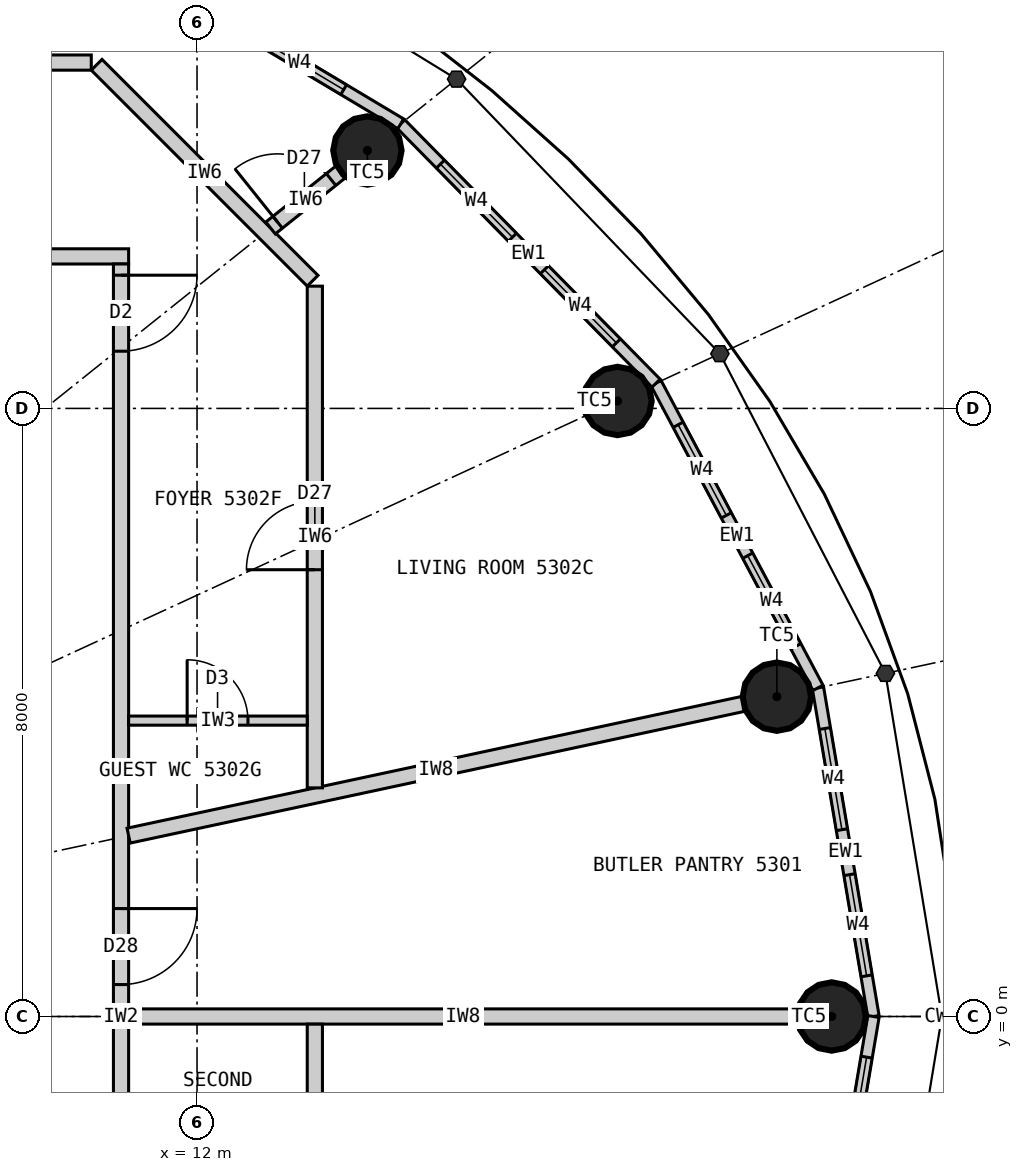
"""IFC4 building model, lengths in metres.
Left out: names, types, materials, properties, quantities, classifications, styles, units other than length and angle.
Written with IfcOpenShell. Run it as: python <this file> out.ifc"""

import sys

from ifc_helpers import new_model, si_unit, direction, frame, frame_2d, origin, origin_2d, place, context, subcontext, project, spatial, rectangle, circle, extrude, element, fill, save


model = new_model("IFC4")
c1 = context("Model", 3, precision=1e-05, world=origin(), true_north=direction((0.0, 1.0)))
c2 = subcontext(c1, "Body", "Model", "MODEL_VIEW")
j1 = project(units=[si_unit("LENGTHUNIT", "METRE"), si_unit("PLANEANGLEUNIT", "RADIAN")], contexts=[c1])
p1 = place(None, origin())
s1 = spatial("IfcSite", under=j1, at=p1, CompositionType="ELEMENT")
p2 = place(p1, origin())
s2 = spatial("IfcBuilding", under=s1, at=p2, CompositionType="ELEMENT")
p3 = place(p2, frame((0.0, 0.0, 199.5)))
s3 = spatial("IfcBuildingStorey", under=s2, at=p3, CompositionType="ELEMENT", Elevation=199.5)
for number, where, z_axis, x_axis in (
    (1, (20.35, 0.0, 0.0), (0.0, 0.0, 1.0), (1.0, 0.0, 0.0)),
    (2, (19.629, 4.208, 0.0), (0.0, 0.0, 1.0), (1.0, 0.0, 0.0)),
    (3, (17.532, 8.098, 0.0), (0.0, 0.0, 1.0), (1.0, 0.0, 0.0)),
    (4, (14.241, 11.393, 0.0), (0.0, 0.0, 1.0), (1.0, 0.0, 0.0)),
):
    element("IfcColumn", number, at=place(p3, frame(where, z_axis=z_axis, x_axis=x_axis)), inside=s3, PredefinedType="COLUMN", context=c2, shape_type="SweptSolid", body=[
        extrude(circle(Radius=0.45, at=origin_2d()), origin(), (0.0, 0.0, 1.0), 3.3),
    ])
p4 = place(p3, frame((20.9, 0.0, 0.0), z_axis=(0.0, 0.0, 1.0), x_axis=(-0.166538513568, 0.986034950445, 0.0)))
e5 = element("IfcWall", 5, at=p4, inside=s3, PredefinedType="ELEMENTEDWALL", context=c2, shape_type="SweptSolid", body=[
    extrude(rectangle(XDim=4.385, YDim=0.15, at=frame_2d((2.192, 0.0))), origin(), (0.0, 0.0, 1.0), 3.12),
])
p5 = place(p4, frame((0.542, 0.0, 0.9)))
e6 = element("IfcOpeningElement", 6, at=p5, cuts=e5, PredefinedType="OPENING", context=c2, shape_type="SweptSolid", body=[
    extrude(rectangle(XDim=1.35, YDim=1.9, at=frame_2d((0.675, 0.95))), frame((0.0, 0.085, 0.0), z_axis=(0.0, -1.0, 0.0), x_axis=(1.0, 0.0, 0.0)), (0.0, 0.0, 1.0), 0.17),
])
p6 = place(p4, frame((2.492, 0.0, 0.9)))
e7 = element("IfcOpeningElement", 7, at=p6, cuts=e5, PredefinedType="OPENING", context=c2, shape_type="SweptSolid", body=[
    extrude(rectangle(XDim=1.35, YDim=1.9, at=frame_2d((0.675, 0.95))), frame((0.0, 0.085, 0.0), z_axis=(0.0, -1.0, 0.0), x_axis=(1.0, 0.0, 0.0)), (0.0, 0.0, 1.0), 0.17),
])
p7 = place(p3, frame((20.17, 4.323, 0.0), z_axis=(0.0, 0.0, 1.0), x_axis=(-0.469256152955, 0.883062094597, 0.0)))
e8 = element("IfcWall", 8, at=p7, inside=s3, PredefinedType="ELEMENTEDWALL", context=c2, shape_type="SweptSolid", body=[
    extrude(rectangle(XDim=4.539, YDim=0.15, at=frame_2d((2.27, 0.0))), origin(), (0.0, 0.0, 1.0), 3.12),
])
p8 = place(p7, frame((0.62, 0.0, 0.9)))
e9 = element("IfcOpeningElement", 9, at=p8, cuts=e8, PredefinedType="OPENING", context=c2, shape_type="SweptSolid", body=[
    extrude(rectangle(XDim=1.35, YDim=1.9, at=frame_2d((0.675, 0.95))), frame((0.0, 0.085, 0.0), z_axis=(0.0, -1.0, 0.0), x_axis=(1.0, 0.0, 0.0)), (0.0, 0.0, 1.0), 0.17),
])
p9 = place(p7, frame((2.57, 0.0, 0.9)))
e10 = element("IfcOpeningElement", 10, at=p9, cuts=e8, PredefinedType="OPENING", context=c2, shape_type="SweptSolid", body=[
    extrude(rectangle(XDim=1.35, YDim=1.9, at=frame_2d((0.675, 0.95))), frame((0.0, 0.085, 0.0), z_axis=(0.0, -1.0, 0.0), x_axis=(1.0, 0.0, 0.0)), (0.0, 0.0, 1.0), 0.17),
])
p10 = place(p3, frame((18.04, 8.332, 0.0), z_axis=(0.0, 0.0, 1.0), x_axis=(-0.701527379618, 0.712642501993, 0.0)))
e11 = element("IfcWall", 11, at=p10, inside=s3, PredefinedType="ELEMENTEDWALL", context=c2, shape_type="SweptSolid", body=[
    extrude(rectangle(XDim=4.788, YDim=0.15, at=frame_2d((2.394, 0.0))), origin(), (0.0, 0.0, 1.0), 3.12),
])
p11 = place(p10, frame((0.744, 0.0, 0.9)))
e12 = element("IfcOpeningElement", 12, at=p11, cuts=e11, PredefinedType="OPENING", context=c2, shape_type="SweptSolid", body=[
    extrude(rectangle(XDim=1.35, YDim=1.9, at=frame_2d((0.675, 0.95))), frame((0.0, 0.085, 0.0), z_axis=(0.0, -1.0, 0.0), x_axis=(1.0, 0.0, 0.0)), (0.0, 0.0, 1.0), 0.17),
])
p12 = place(p10, frame((2.694, 0.0, 0.9)))
e13 = element("IfcOpeningElement", 13, at=p12, cuts=e11, PredefinedType="OPENING", context=c2, shape_type="SweptSolid", body=[
    extrude(rectangle(XDim=1.35, YDim=1.9, at=frame_2d((0.675, 0.95))), frame((0.0, 0.085, 0.0), z_axis=(0.0, -1.0, 0.0), x_axis=(1.0, 0.0, 0.0)), (0.0, 0.0, 1.0), 0.17),
])
p13 = place(p3, frame((14.68, 11.744, 0.0), z_axis=(0.0, 0.0, 1.0), x_axis=(-0.85822150553, 0.513279502265, 0.0)))
e14 = element("IfcWall", 14, at=p13, inside=s3, PredefinedType="ELEMENTEDWALL", context=c2, shape_type="SweptSolid", body=[
    extrude(rectangle(XDim=5.05, YDim=0.15, at=frame_2d((2.525, 0.0))), origin(), (0.0, 0.0, 1.0), 3.12),
])
p14 = place(p13, frame((0.875, 0.0, 0.9)))
e15 = element("IfcOpeningElement", 15, at=p14, cuts=e14, PredefinedType="OPENING", context=c2, shape_type="SweptSolid", body=[
    extrude(rectangle(XDim=1.35, YDim=1.9, at=frame_2d((0.675, 0.95))), frame((0.0, 0.085, 0.0), z_axis=(0.0, -1.0, 0.0), x_axis=(1.0, 0.0, 0.0)), (0.0, 0.0, 1.0), 0.17),
])
p15 = place(p13, frame((2.825, 0.0, 0.9)))
e16 = element("IfcOpeningElement", 16, at=p15, cuts=e14, PredefinedType="OPENING", context=c2, shape_type="SweptSolid", body=[
    extrude(rectangle(XDim=1.35, YDim=1.9, at=frame_2d((0.675, 0.95))), frame((0.0, 0.085, 0.0), z_axis=(0.0, -1.0, 0.0), x_axis=(1.0, 0.0, 0.0)), (0.0, 0.0, 1.0), 0.17),
])
p16 = place(p3, frame((20.17, -4.323, 0.0), z_axis=(0.0, 0.0, 1.0), x_axis=(0.166538513568, 0.986034950445, 0.0)))
e17 = element("IfcWall", 17, at=p16, inside=s3, PredefinedType="ELEMENTEDWALL", context=c2, shape_type="SweptSolid", body=[
    extrude(rectangle(XDim=4.385, YDim=0.15, at=frame_2d((2.192, 0.0))), origin(), (0.0, 0.0, 1.0), 3.12),
])
p17 = place(p16, frame((0.542, 0.0, 0.9)))
e18 = element("IfcOpeningElement", 18, at=p17, cuts=e17, PredefinedType="OPENING", context=c2, shape_type="SweptSolid", body=[
    extrude(rectangle(XDim=1.35, YDim=1.9, at=frame_2d((0.675, 0.95))), frame((0.0, 0.085, 0.0), z_axis=(0.0, -1.0, 0.0), x_axis=(1.0, 0.0, 0.0)), (0.0, 0.0, 1.0), 0.17),
])
p18 = place(p16, frame((2.492, 0.0, 0.9)))
e19 = element("IfcOpeningElement", 19, at=p18, cuts=e17, PredefinedType="OPENING", context=c2, shape_type="SweptSolid", body=[
    extrude(rectangle(XDim=1.35, YDim=1.9, at=frame_2d((0.675, 0.95))), frame((0.0, 0.085, 0.0), z_axis=(0.0, -1.0, 0.0), x_axis=(1.0, 0.0, 0.0)), (0.0, 0.0, 1.0), 0.17),
])
p19 = place(p3, frame((-11.1, 10.0, 0.0), z_axis=(0.0, 0.0, 1.0), x_axis=(1.0, 0.0, 0.0)))
e20 = element("IfcWall", 20, at=p19, inside=s3, PredefinedType="PARTITIONING", context=c2, shape_type="SweptSolid", body=[
    extrude(rectangle(XDim=22.2, YDim=0.2, at=frame_2d((11.1, 0.0))), origin(), (0.0, 0.0, 1.0), 3.12),
])
p20 = place(p19, frame((2.309, 0.0, 0.0)))
e21 = element("IfcOpeningElement", 21, at=p20, cuts=e20, PredefinedType="OPENING", context=c2, shape_type="SweptSolid", body=[
    extrude(rectangle(XDim=1.0, YDim=2.2, at=frame_2d((0.5, 1.1))), frame((0.0, 0.11, 0.0), z_axis=(0.0, -1.0, 0.0), x_axis=(1.0, 0.0, 0.0)), (0.0, 0.0, 1.0), 0.22),
])
p21 = place(p3, frame((11.0, -9.9, 0.0), z_axis=(0.0, 0.0, 1.0), x_axis=(0.0, 1.0, 0.0)))
e22 = element("IfcWall", 22, at=p21, inside=s3, PredefinedType="PARTITIONING", context=c2, shape_type="SweptSolid", body=[
    extrude(rectangle(XDim=19.8, YDim=0.2, at=frame_2d((9.9, 0.0))), origin(), (0.0, 0.0, 1.0), 3.12),
])
p22 = place(p21, frame((10.32, 0.0, 0.0)))
e23 = element("IfcOpeningElement", 23, at=p22, cuts=e22, PredefinedType="OPENING", context=c2, shape_type="SweptSolid", body=[
    extrude(rectangle(XDim=1.0, YDim=2.2, at=frame_2d((0.5, 1.1))), frame((0.0, 0.11, 0.0), z_axis=(0.0, -1.0, 0.0), x_axis=(1.0, 0.0, 0.0)), (0.0, 0.0, 1.0), 0.22),
])
p23 = place(p21, frame((18.653, 0.0, 0.0)))
e24 = element("IfcOpeningElement", 24, at=p23, cuts=e22, PredefinedType="OPENING", context=c2, shape_type="SweptSolid", body=[
    extrude(rectangle(XDim=1.0, YDim=2.2, at=frame_2d((0.5, 1.1))), frame((0.0, 0.11, 0.0), z_axis=(0.0, -1.0, 0.0), x_axis=(1.0, 0.0, 0.0)), (0.0, 0.0, 1.0), 0.22),
])
p24 = place(p21, frame((0.379, 0.0, 0.0)))
e25 = element("IfcOpeningElement", 25, at=p24, cuts=e22, PredefinedType="OPENING", context=c2, shape_type="SweptSolid", body=[
    extrude(rectangle(XDim=1.0, YDim=2.2, at=frame_2d((0.5, 1.1))), frame((0.0, 0.11, 0.0), z_axis=(0.0, -1.0, 0.0), x_axis=(1.0, 0.0, 0.0)), (0.0, 0.0, 1.0), 0.22),
])
p25 = place(p3, frame((11.1, 0.0, 0.0), z_axis=(0.0, 0.0, 1.0), x_axis=(1.0, 0.0, 0.0)))
e26 = element("IfcWall", 26, at=p25, inside=s3, PredefinedType="PARTITIONING", context=c2, shape_type="SweptSolid", body=[
    extrude(rectangle(XDim=8.8, YDim=0.2, at=frame_2d((4.4, 0.0))), origin(), (0.0, 0.0, 1.0), 2.37),
])
p26 = place(p3, frame((11.1, 2.379, 0.0), z_axis=(0.0, 0.0, 1.0), x_axis=(0.977789888126, 0.209587534647, 0.0)))
e27 = element("IfcWall", 27, at=p26, inside=s3, PredefinedType="PARTITIONING", context=c2, shape_type="SweptSolid", body=[
    extrude(rectangle(XDim=8.273, YDim=0.2, at=frame_2d((4.136, 0.0))), origin(), (0.0, 0.0, 1.0), 2.42),
])
p27 = place(p3, frame((13.55, 3.008, 0.0), z_axis=(0.0, 0.0, 1.0), x_axis=(0.0, 1.0, 0.0)))
e28 = element("IfcWall", 28, at=p27, inside=s3, PredefinedType="PARTITIONING", context=c2, shape_type="SweptSolid", body=[
    extrude(rectangle(XDim=6.601, YDim=0.2, at=frame_2d((3.3, 0.0))), origin(), (0.0, 0.0, 1.0), 3.12),
])
p28 = place(p27, frame((2.87, 0.0, 0.0)))
e29 = element("IfcOpeningElement", 29, at=p28, cuts=e28, PredefinedType="OPENING", context=c2, shape_type="SweptSolid", body=[
    extrude(rectangle(XDim=0.9, YDim=2.1, at=frame_2d((0.45, 1.05))), frame((0.0, 0.11, 0.0), z_axis=(0.0, -1.0, 0.0), x_axis=(1.0, 0.0, 0.0)), (0.0, 0.0, 1.0), 0.22),
])
p29 = place(p3, frame((13.521, 9.679, 0.0), z_axis=(0.0, 0.0, 1.0), x_axis=(-0.707106781187, 0.707106781187, 0.0)))
e30 = element("IfcWall", 30, at=p29, inside=s3, PredefinedType="PARTITIONING", context=c2, shape_type="SweptSolid", body=[
    extrude(rectangle(XDim=4.019, YDim=0.2, at=frame_2d((2.009, 0.0))), origin(), (0.0, 0.0, 1.0), 3.12),
])
p30 = place(p3, frame((10.609, 12.55, 0.0), z_axis=(0.0, 0.0, 1.0), x_axis=(-1.0, 0.0, 0.0)))
e31 = element("IfcWall", 31, at=p30, inside=s3, PredefinedType="PARTITIONING", context=c2, shape_type="SweptSolid", body=[
    extrude(rectangle(XDim=10.508, YDim=0.2, at=frame_2d((5.254, 0.0))), origin(), (0.0, 0.0, 1.0), 3.12),
])
p31 = place(p30, frame((6.588, 0.0, 0.0)))
e32 = element("IfcOpeningElement", 32, at=p31, cuts=e31, PredefinedType="OPENING", context=c2, shape_type="SweptSolid", body=[
    extrude(rectangle(XDim=0.9, YDim=2.1, at=frame_2d((0.45, 1.05))), frame((0.0, 0.11, 0.0), z_axis=(0.0, -1.0, 0.0), x_axis=(1.0, 0.0, 0.0)), (0.0, 0.0, 1.0), 0.22),
])
p32 = place(p30, frame((8.308, 0.0, 0.0)))
e33 = element("IfcOpeningElement", 33, at=p32, cuts=e31, PredefinedType="OPENING", context=c2, shape_type="SweptSolid", body=[
    extrude(rectangle(XDim=0.8, YDim=2.1, at=frame_2d((0.4, 1.05))), frame((0.0, 0.11, 0.0), z_axis=(0.0, -1.0, 0.0), x_axis=(1.0, 0.0, 0.0)), (0.0, 0.0, 1.0), 0.22),
])
p33 = place(p3, frame((12.968, 10.374, 0.0), z_axis=(0.0, 0.0, 1.0), x_axis=(0.780888968944, 0.624669847345, 0.0)))
e34 = element("IfcWall", 34, at=p33, inside=s3, PredefinedType="PARTITIONING", context=c2, shape_type="SweptSolid", body=[
    extrude(rectangle(XDim=1.181, YDim=0.2, at=frame_2d((0.591, 0.0))), origin(), (0.0, 0.0, 1.0), 2.42),
])
p34 = place(p33, frame((0.12, 0.0, 0.0)))
e35 = element("IfcOpeningElement", 35, at=p34, cuts=e34, PredefinedType="OPENING", context=c2, shape_type="SweptSolid", body=[
    extrude(rectangle(XDim=0.9, YDim=2.1, at=frame_2d((0.45, 1.05))), frame((0.0, 0.11, 0.0), z_axis=(0.0, -1.0, 0.0), x_axis=(1.0, 0.0, 0.0)), (0.0, 0.0, 1.0), 0.22),
])
p35 = place(p3, frame((11.1, 3.893, 0.0), z_axis=(0.0, 0.0, 1.0), x_axis=(1.0, 0.0, 0.0)))
e36 = element("IfcWall", 36, at=p35, inside=s3, PredefinedType="PARTITIONING", context=c2, shape_type="SweptSolid", body=[
    extrude(rectangle(XDim=2.35, YDim=0.12, at=frame_2d((1.175, 0.0))), origin(), (0.0, 0.0, 1.0), 3.12),
])
p36 = place(p35, frame((0.77, 0.0, 0.0)))
e37 = element("IfcOpeningElement", 37, at=p36, cuts=e36, PredefinedType="OPENING", context=c2, shape_type="SweptSolid", body=[
    extrude(rectangle(XDim=0.8, YDim=2.1, at=frame_2d((0.4, 1.05))), frame((0.0, 0.07, 0.0), z_axis=(0.0, -1.0, 0.0), x_axis=(1.0, 0.0, 0.0)), (0.0, 0.0, 1.0), 0.14),
])
p37 = place(p3, frame((13.55, -9.609, 0.0), z_axis=(0.0, 0.0, 1.0), x_axis=(0.0, 1.0, 0.0)))
e38 = element("IfcWall", 38, at=p37, inside=s3, PredefinedType="PARTITIONING", context=c2, shape_type="SweptSolid", body=[
    extrude(rectangle(XDim=9.508, YDim=0.2, at=frame_2d((4.754, 0.0))), origin(), (0.0, 0.0, 1.0), 3.12),
])
p38 = place(p37, frame((7.308, 0.0, 0.0)))
e39 = element("IfcOpeningElement", 39, at=p38, cuts=e38, PredefinedType="OPENING", context=c2, shape_type="SweptSolid", body=[
    extrude(rectangle(XDim=0.8, YDim=2.1, at=frame_2d((0.4, 1.05))), frame((0.0, 0.11, 0.0), z_axis=(0.0, -1.0, 0.0), x_axis=(1.0, 0.0, 0.0)), (0.0, 0.0, 1.0), 0.22),
])
p39 = place(p5, origin())
e40 = element("IfcWindow", 40, at=p39, inside=s3, PartitioningType="SINGLE_PANEL", PredefinedType="WINDOW", context=c2, shape_type="SweptSolid", body=[
    extrude(rectangle(XDim=1.35, YDim=1.9, at=frame_2d((0.675, 0.95))), frame((0.0, 0.03, 0.0), z_axis=(0.0, -1.0, 0.0), x_axis=(1.0, 0.0, 0.0)), (0.0, 0.0, 1.0), 0.06),
])
fill(e6, e40)
p40 = place(p6, origin())
e41 = element("IfcWindow", 41, at=p40, inside=s3, PartitioningType="SINGLE_PANEL", PredefinedType="WINDOW", context=c2, shape_type="SweptSolid", body=[
    extrude(rectangle(XDim=1.35, YDim=1.9, at=frame_2d((0.675, 0.95))), frame((0.0, 0.03, 0.0), z_axis=(0.0, -1.0, 0.0), x_axis=(1.0, 0.0, 0.0)), (0.0, 0.0, 1.0), 0.06),
])
fill(e7, e41)
p41 = place(p8, origin())
e42 = element("IfcWindow", 42, at=p41, inside=s3, PartitioningType="SINGLE_PANEL", PredefinedType="WINDOW", context=c2, shape_type="SweptSolid", body=[
    extrude(rectangle(XDim=1.35, YDim=1.9, at=frame_2d((0.675, 0.95))), frame((0.0, 0.03, 0.0), z_axis=(0.0, -1.0, 0.0), x_axis=(1.0, 0.0, 0.0)), (0.0, 0.0, 1.0), 0.06),
])
fill(e9, e42)
p42 = place(p9, origin())
e43 = element("IfcWindow", 43, at=p42, inside=s3, PartitioningType="SINGLE_PANEL", PredefinedType="WINDOW", context=c2, shape_type="SweptSolid", body=[
    extrude(rectangle(XDim=1.35, YDim=1.9, at=frame_2d((0.675, 0.95))), frame((0.0, 0.03, 0.0), z_axis=(0.0, -1.0, 0.0), x_axis=(1.0, 0.0, 0.0)), (0.0, 0.0, 1.0), 0.06),
])
fill(e10, e43)
p43 = place(p11, origin())
e44 = element("IfcWindow", 44, at=p43, inside=s3, PartitioningType="SINGLE_PANEL", PredefinedType="WINDOW", context=c2, shape_type="SweptSolid", body=[
    extrude(rectangle(XDim=1.35, YDim=1.9, at=frame_2d((0.675, 0.95))), frame((0.0, 0.03, 0.0), z_axis=(0.0, -1.0, 0.0), x_axis=(1.0, 0.0, 0.0)), (0.0, 0.0, 1.0), 0.06),
])
fill(e12, e44)
p44 = place(p12, origin())
e45 = element("IfcWindow", 45, at=p44, inside=s3, PartitioningType="SINGLE_PANEL", PredefinedType="WINDOW", context=c2, shape_type="SweptSolid", body=[
    extrude(rectangle(XDim=1.35, YDim=1.9, at=frame_2d((0.675, 0.95))), frame((0.0, 0.03, 0.0), z_axis=(0.0, -1.0, 0.0), x_axis=(1.0, 0.0, 0.0)), (0.0, 0.0, 1.0), 0.06),
])
fill(e13, e45)
p45 = place(p14, origin())
e46 = element("IfcWindow", 46, at=p45, inside=s3, PartitioningType="SINGLE_PANEL", PredefinedType="WINDOW", context=c2, shape_type="SweptSolid", body=[
    extrude(rectangle(XDim=1.35, YDim=1.9, at=frame_2d((0.675, 0.95))), frame((0.0, 0.03, 0.0), z_axis=(0.0, -1.0, 0.0), x_axis=(1.0, 0.0, 0.0)), (0.0, 0.0, 1.0), 0.06),
])
fill(e15, e46)
p46 = place(p18, origin())
e47 = element("IfcWindow", 47, at=p46, inside=s3, PartitioningType="SINGLE_PANEL", PredefinedType="WINDOW", context=c2, shape_type="SweptSolid", body=[
    extrude(rectangle(XDim=1.35, YDim=1.9, at=frame_2d((0.675, 0.95))), frame((0.0, 0.03, 0.0), z_axis=(0.0, -1.0, 0.0), x_axis=(1.0, 0.0, 0.0)), (0.0, 0.0, 1.0), 0.06),
])
fill(e19, e47)
p47 = place(p22, origin())
e48 = element("IfcDoor", 48, at=p47, inside=s3, OperationType="SINGLE_SWING_RIGHT", PredefinedType="DOOR", context=c2, shape_type="SweptSolid", body=[
    extrude(rectangle(XDim=1.0, YDim=2.2, at=frame_2d((0.5, 1.1))), frame((0.0, 0.025, 0.0), z_axis=(0.0, -1.0, 0.0), x_axis=(1.0, 0.0, 0.0)), (0.0, 0.0, 1.0), 0.05),
])
fill(e23, e48)
p48 = place(p23, origin())
e49 = element("IfcDoor", 49, at=p48, inside=s3, OperationType="SINGLE_SWING_RIGHT", PredefinedType="DOOR", context=c2, shape_type="SweptSolid", body=[
    extrude(rectangle(XDim=1.0, YDim=2.2, at=frame_2d((0.5, 1.1))), frame((0.0, 0.025, 0.0), z_axis=(0.0, -1.0, 0.0), x_axis=(1.0, 0.0, 0.0)), (0.0, 0.0, 1.0), 0.05),
])
fill(e24, e49)
p49 = place(p36, origin())
e50 = element("IfcDoor", 50, at=p49, inside=s3, OperationType="SINGLE_SWING_LEFT", PredefinedType="DOOR", context=c2, shape_type="SweptSolid", body=[
    extrude(rectangle(XDim=0.8, YDim=2.1, at=frame_2d((0.4, 1.05))), frame((0.0, 0.025, 0.0), z_axis=(0.0, -1.0, 0.0), x_axis=(1.0, 0.0, 0.0)), (0.0, 0.0, 1.0), 0.05),
])
fill(e37, e50)
p50 = place(p28, origin())
e51 = element("IfcDoor", 51, at=p50, inside=s3, OperationType="SINGLE_SWING_LEFT", PredefinedType="DOOR", context=c2, shape_type="SweptSolid", body=[
    extrude(rectangle(XDim=0.9, YDim=2.1, at=frame_2d((0.45, 1.05))), frame((0.0, 0.025, 0.0), z_axis=(0.0, -1.0, 0.0), x_axis=(1.0, 0.0, 0.0)), (0.0, 0.0, 1.0), 0.05),
])
fill(e29, e51)
p51 = place(p34, origin())
e52 = element("IfcDoor", 52, at=p51, inside=s3, OperationType="SINGLE_SWING_LEFT", PredefinedType="DOOR", context=c2, shape_type="SweptSolid", body=[
    extrude(rectangle(XDim=0.9, YDim=2.1, at=frame_2d((0.45, 1.05))), frame((0.0, 0.025, 0.0), z_axis=(0.0, -1.0, 0.0), x_axis=(1.0, 0.0, 0.0)), (0.0, 0.0, 1.0), 0.05),
])
fill(e35, e52)
save(model, sys.argv[1])
